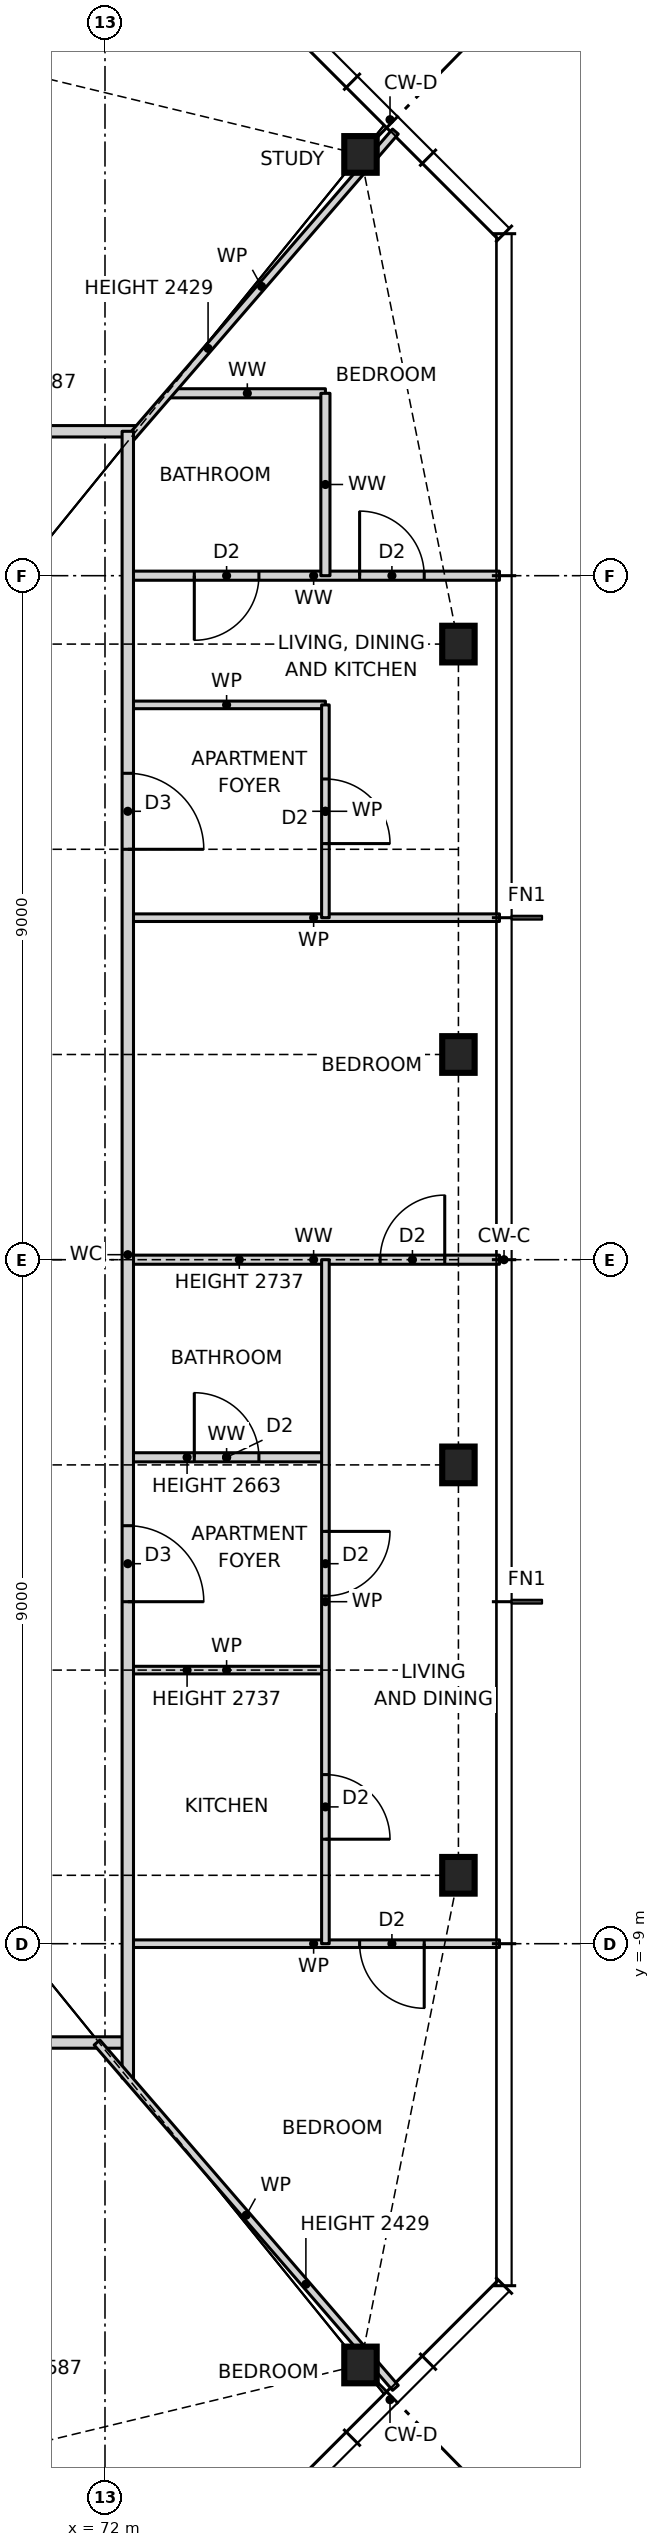
"""IFC4 building model, lengths in metres.
Left out: names, types, materials, properties, quantities, classifications, styles, units other than length and angle.
Written with IfcOpenShell. Run it as: python <this file> out.ifc"""

import sys

from ifc_helpers import new_model, si_unit, direction, frame, frame_2d, origin, origin_2d, place, context, subcontext, project, spatial, rectangle, i_section, extrude, element, fill, save


model = new_model("IFC4")
c1 = context("Model", 3, precision=1e-05, world=origin(), true_north=direction((0.0, 1.0)))
c2 = subcontext(c1, "Body", "Model", "MODEL_VIEW")
j1 = project(units=[si_unit("LENGTHUNIT", "METRE"), si_unit("PLANEANGLEUNIT", "RADIAN")], contexts=[c1])
p1 = place(None, origin())
s1 = spatial("IfcSite", under=j1, at=p1, CompositionType="ELEMENT")
p2 = place(p1, origin())
s2 = spatial("IfcBuilding", under=s1, at=p2, CompositionType="ELEMENT")
p3 = place(p2, frame((0.0, 0.0, 108.5)))
s3 = spatial("IfcBuildingStorey", under=s2, at=p3, CompositionType="ELEMENT", Elevation=108.5)
for number, where, z_axis, x_axis in (
    (1, (75.361, -14.543, 0.0), (0.0, 0.0, 1.0), (1.0, 0.0, 0.0)),
    (2, (76.65, -8.1, 0.0), (0.0, 0.0, 1.0), (1.0, 0.0, 0.0)),
    (3, (76.65, -2.7, 0.0), (0.0, 0.0, 1.0), (1.0, 0.0, 0.0)),
    (4, (76.65, 2.7, 0.0), (0.0, 0.0, 1.0), (1.0, 0.0, 0.0)),
    (5, (76.65, 8.1, 0.0), (0.0, 0.0, 1.0), (1.0, 0.0, 0.0)),
    (6, (75.361, 14.543, 0.0), (0.0, 0.0, 1.0), (1.0, 0.0, 0.0)),
):
    element("IfcColumn", number, at=place(p3, frame(where, z_axis=z_axis, x_axis=x_axis)), inside=s3, PredefinedType="COLUMN", context=c2, shape_type="SweptSolid", body=[
        extrude(i_section(OverallWidth=0.427, OverallDepth=0.483, WebThickness=0.051, FlangeThickness=0.082, at=origin_2d()), origin(), (0.0, 0.0, 1.0), 3.5),
    ])
p4 = place(p3, frame((53.7, -10.3, 0.0), z_axis=(0.0, 0.0, 1.0), x_axis=(1.0, 0.0, 0.0)))
e7 = element("IfcWall", 7, at=p4, inside=s3, PredefinedType="PARTITIONING", context=c2, shape_type="SweptSolid", body=[
    extrude(rectangle(XDim=18.6, YDim=0.15, at=frame_2d((9.3, 0.0))), origin(), (0.0, 0.0, 1.0), 3.27),
])
p5 = place(p4, frame((8.8, 0.0, 0.0)))
e8 = element("IfcOpeningElement", 8, at=p5, cuts=e7, PredefinedType="OPENING", context=c2, shape_type="SweptSolid", body=[
    extrude(rectangle(XDim=1.0, YDim=2.1, at=frame_2d((0.5, 1.05))), frame((0.0, 0.085, 0.0), z_axis=(0.0, -1.0, 0.0), x_axis=(1.0, 0.0, 0.0)), (0.0, 0.0, 1.0), 0.17),
])
p6 = place(p3, frame((72.3, -9.0, 0.0), z_axis=(0.0, 0.0, 1.0), x_axis=(1.0, 0.0, 0.0)))
e9 = element("IfcWall", 9, at=p6, inside=s3, PredefinedType="PARTITIONING", context=c2, shape_type="SweptSolid", body=[
    extrude(rectangle(XDim=4.89, YDim=0.1, at=frame_2d((2.445, 0.0))), origin(), (0.0, 0.0, 1.0), 3.27),
])
p7 = place(p6, frame((3.05, 0.0, 0.0)))
e10 = element("IfcOpeningElement", 10, at=p7, cuts=e9, PredefinedType="OPENING", context=c2, shape_type="SweptSolid", body=[
    extrude(rectangle(XDim=0.85, YDim=2.1, at=frame_2d((0.425, 1.05))), frame((0.0, 0.06, 0.0), z_axis=(0.0, -1.0, 0.0), x_axis=(1.0, 0.0, 0.0)), (0.0, 0.0, 1.0), 0.12),
])
p8 = place(p3, frame((72.3, -5.4, 0.0), z_axis=(0.0, 0.0, 1.0), x_axis=(1.0, 0.0, 0.0)))
e11 = element("IfcWall", 11, at=p8, inside=s3, PredefinedType="PARTITIONING", context=c2, shape_type="SweptSolid", body=[
    extrude(rectangle(XDim=2.6, YDim=0.1, at=frame_2d((1.3, 0.0))), origin(), (0.0, 0.0, 1.0), 2.737),
])
p9 = place(p3, frame((72.3, -2.6, 0.0), z_axis=(0.0, 0.0, 1.0), x_axis=(1.0, 0.0, 0.0)))
e12 = element("IfcWall", 12, at=p9, inside=s3, PredefinedType="PARTITIONING", context=c2, shape_type="SweptSolid", body=[
    extrude(rectangle(XDim=2.6, YDim=0.12, at=frame_2d((1.3, 0.0))), origin(), (0.0, 0.0, 1.0), 2.663),
])
p10 = place(p9, frame((0.875, 0.0, 0.0)))
e13 = element("IfcOpeningElement", 13, at=p10, cuts=e12, PredefinedType="OPENING", context=c2, shape_type="SweptSolid", body=[
    extrude(rectangle(XDim=0.85, YDim=2.1, at=frame_2d((0.425, 1.05))), frame((0.0, 0.07, 0.0), z_axis=(0.0, -1.0, 0.0), x_axis=(1.0, 0.0, 0.0)), (0.0, 0.0, 1.0), 0.14),
])
p11 = place(p3, frame((72.3, 0.0, 0.0), z_axis=(0.0, 0.0, 1.0), x_axis=(1.0, 0.0, 0.0)))
e14 = element("IfcWall", 14, at=p11, inside=s3, PredefinedType="PARTITIONING", context=c2, shape_type="SweptSolid", body=[
    extrude(rectangle(XDim=4.89, YDim=0.12, at=frame_2d((2.445, 0.0))), origin(), (0.0, 0.0, 1.0), 2.737),
])
p12 = place(p11, frame((3.32, 0.0, 0.0)))
e15 = element("IfcOpeningElement", 15, at=p12, cuts=e14, PredefinedType="OPENING", context=c2, shape_type="SweptSolid", body=[
    extrude(rectangle(XDim=0.85, YDim=2.1, at=frame_2d((0.425, 1.05))), frame((0.0, 0.07, 0.0), z_axis=(0.0, -1.0, 0.0), x_axis=(1.0, 0.0, 0.0)), (0.0, 0.0, 1.0), 0.14),
])
p13 = place(p3, frame((72.3, 4.5, 0.0), z_axis=(0.0, 0.0, 1.0), x_axis=(1.0, 0.0, 0.0)))
e16 = element("IfcWall", 16, at=p13, inside=s3, PredefinedType="PARTITIONING", context=c2, shape_type="SweptSolid", body=[
    extrude(rectangle(XDim=4.89, YDim=0.1, at=frame_2d((2.445, 0.0))), origin(), (0.0, 0.0, 1.0), 3.27),
])
p14 = place(p3, frame((72.3, 7.3, 0.0), z_axis=(0.0, 0.0, 1.0), x_axis=(1.0, 0.0, 0.0)))
e17 = element("IfcWall", 17, at=p14, inside=s3, PredefinedType="PARTITIONING", context=c2, shape_type="SweptSolid", body=[
    extrude(rectangle(XDim=2.6, YDim=0.1, at=frame_2d((1.3, 0.0))), origin(), (0.0, 0.0, 1.0), 3.27),
])
p15 = place(p3, frame((72.3, 9.0, 0.0), z_axis=(0.0, 0.0, 1.0), x_axis=(1.0, 0.0, 0.0)))
e18 = element("IfcWall", 18, at=p15, inside=s3, PredefinedType="PARTITIONING", context=c2, shape_type="SweptSolid", body=[
    extrude(rectangle(XDim=4.89, YDim=0.12, at=frame_2d((2.445, 0.0))), origin(), (0.0, 0.0, 1.0), 3.27),
])
p16 = place(p15, frame((0.875, 0.0, 0.0)))
e19 = element("IfcOpeningElement", 19, at=p16, cuts=e18, PredefinedType="OPENING", context=c2, shape_type="SweptSolid", body=[
    extrude(rectangle(XDim=0.85, YDim=2.1, at=frame_2d((0.425, 1.05))), frame((0.0, 0.07, 0.0), z_axis=(0.0, -1.0, 0.0), x_axis=(1.0, 0.0, 0.0)), (0.0, 0.0, 1.0), 0.14),
])
p17 = place(p15, frame((3.05, 0.0, 0.0)))
e20 = element("IfcOpeningElement", 20, at=p17, cuts=e18, PredefinedType="OPENING", context=c2, shape_type="SweptSolid", body=[
    extrude(rectangle(XDim=0.85, YDim=2.1, at=frame_2d((0.425, 1.05))), frame((0.0, 0.07, 0.0), z_axis=(0.0, -1.0, 0.0), x_axis=(1.0, 0.0, 0.0)), (0.0, 0.0, 1.0), 0.14),
])
p18 = place(p3, frame((53.586, 10.9, 0.0), z_axis=(0.0, 0.0, 1.0), x_axis=(1.0, 0.0, 0.0)))
e21 = element("IfcWall", 21, at=p18, inside=s3, PredefinedType="PARTITIONING", context=c2, shape_type="SweptSolid", body=[
    extrude(rectangle(XDim=18.828, YDim=0.15, at=frame_2d((9.414, 0.0))), origin(), (0.0, 0.0, 1.0), 3.27),
])
p19 = place(p18, frame((8.914, 0.0, 0.0)))
e22 = element("IfcOpeningElement", 22, at=p19, cuts=e21, PredefinedType="OPENING", context=c2, shape_type="SweptSolid", body=[
    extrude(rectangle(XDim=1.0, YDim=2.1, at=frame_2d((0.5, 1.05))), frame((0.0, 0.085, 0.0), z_axis=(0.0, -1.0, 0.0), x_axis=(1.0, 0.0, 0.0)), (0.0, 0.0, 1.0), 0.17),
])
p20 = place(p3, frame((72.845, 11.4, 0.0), z_axis=(0.0, 0.0, 1.0), x_axis=(1.0, 0.0, 0.0)))
e23 = element("IfcWall", 23, at=p20, inside=s3, PredefinedType="PARTITIONING", context=c2, shape_type="SweptSolid", body=[
    extrude(rectangle(XDim=2.055, YDim=0.12, at=frame_2d((1.027, 0.0))), origin(), (0.0, 0.0, 1.0), 3.27),
])
p21 = place(p3, frame((72.3, 10.768, 0.0), z_axis=(0.0, 0.0, 1.0), x_axis=(0.653709560919, 0.756745538449, 0.0)))
e24 = element("IfcWall", 24, at=p21, inside=s3, PredefinedType="PARTITIONING", context=c2, shape_type="SweptSolid", body=[
    extrude(rectangle(XDim=5.386, YDim=0.1, at=frame_2d((2.693, 0.0))), origin(), (0.0, 0.0, 1.0), 2.429),
])
p22 = place(p3, frame((74.9, -9.0, 0.0), z_axis=(0.0, 0.0, 1.0), x_axis=(0.0, 1.0, 0.0)))
e25 = element("IfcWall", 25, at=p22, inside=s3, PredefinedType="PARTITIONING", context=c2, shape_type="SweptSolid", body=[
    extrude(rectangle(XDim=9.0, YDim=0.1, at=frame_2d((4.5, 0.0))), origin(), (0.0, 0.0, 1.0), 3.27),
])
p23 = place(p22, frame((1.375, 0.0, 0.0)))
e26 = element("IfcOpeningElement", 26, at=p23, cuts=e25, PredefinedType="OPENING", context=c2, shape_type="SweptSolid", body=[
    extrude(rectangle(XDim=0.85, YDim=2.1, at=frame_2d((0.425, 1.05))), frame((0.0, 0.06, 0.0), z_axis=(0.0, -1.0, 0.0), x_axis=(1.0, 0.0, 0.0)), (0.0, 0.0, 1.0), 0.12),
])
p24 = place(p22, frame((4.575, 0.0, 0.0)))
e27 = element("IfcOpeningElement", 27, at=p24, cuts=e25, PredefinedType="OPENING", context=c2, shape_type="SweptSolid", body=[
    extrude(rectangle(XDim=0.85, YDim=2.1, at=frame_2d((0.425, 1.05))), frame((0.0, 0.06, 0.0), z_axis=(0.0, -1.0, 0.0), x_axis=(1.0, 0.0, 0.0)), (0.0, 0.0, 1.0), 0.12),
])
p25 = place(p3, frame((74.9, 4.5, 0.0), z_axis=(0.0, 0.0, 1.0), x_axis=(0.0, 1.0, 0.0)))
e28 = element("IfcWall", 28, at=p25, inside=s3, PredefinedType="PARTITIONING", context=c2, shape_type="SweptSolid", body=[
    extrude(rectangle(XDim=2.8, YDim=0.1, at=frame_2d((1.4, 0.0))), origin(), (0.0, 0.0, 1.0), 3.27),
])
p26 = place(p25, frame((0.975, 0.0, 0.0)))
e29 = element("IfcOpeningElement", 29, at=p26, cuts=e28, PredefinedType="OPENING", context=c2, shape_type="SweptSolid", body=[
    extrude(rectangle(XDim=0.85, YDim=2.1, at=frame_2d((0.425, 1.05))), frame((0.0, 0.06, 0.0), z_axis=(0.0, -1.0, 0.0), x_axis=(1.0, 0.0, 0.0)), (0.0, 0.0, 1.0), 0.12),
])
p27 = place(p3, frame((74.9, 9.0, 0.0), z_axis=(0.0, 0.0, 1.0), x_axis=(0.0, 1.0, 0.0)))
e30 = element("IfcWall", 30, at=p27, inside=s3, PredefinedType="PARTITIONING", context=c2, shape_type="SweptSolid", body=[
    extrude(rectangle(XDim=2.4, YDim=0.12, at=frame_2d((1.2, 0.0))), origin(), (0.0, 0.0, 1.0), 3.27),
])
p28 = place(p3, frame((72.3, -10.768, 0.0), z_axis=(0.0, 0.0, 1.0), x_axis=(0.0, 1.0, 0.0)))
e31 = element("IfcWall", 31, at=p28, inside=s3, PredefinedType="PARTITIONING", context=c2, shape_type="SweptSolid", body=[
    extrude(rectangle(XDim=21.668, YDim=0.15, at=frame_2d((10.834, 0.0))), origin(), (0.0, 0.0, 1.0), 3.27),
])
p29 = place(p28, frame((6.268, 0.0, 0.0)))
e32 = element("IfcOpeningElement", 32, at=p29, cuts=e31, PredefinedType="OPENING", context=c2, shape_type="SweptSolid", body=[
    extrude(rectangle(XDim=1.0, YDim=2.1, at=frame_2d((0.5, 1.05))), frame((0.0, 0.085, 0.0), z_axis=(0.0, -1.0, 0.0), x_axis=(1.0, 0.0, 0.0)), (0.0, 0.0, 1.0), 0.17),
])
p30 = place(p28, frame((16.168, 0.0, 0.0)))
e33 = element("IfcOpeningElement", 33, at=p30, cuts=e31, PredefinedType="OPENING", context=c2, shape_type="SweptSolid", body=[
    extrude(rectangle(XDim=1.0, YDim=2.1, at=frame_2d((0.5, 1.05))), frame((0.0, 0.085, 0.0), z_axis=(0.0, -1.0, 0.0), x_axis=(1.0, 0.0, 0.0)), (0.0, 0.0, 1.0), 0.17),
])
p31 = place(p3, frame((75.821, -14.844, 0.0), z_axis=(0.0, 0.0, 1.0), x_axis=(-0.65378286253, 0.756682211144, 0.0)))
e34 = element("IfcWall", 34, at=p31, inside=s3, PredefinedType="PARTITIONING", context=c2, shape_type="SweptSolid", body=[
    extrude(rectangle(XDim=6.005, YDim=0.1, at=frame_2d((3.002, 0.0))), origin(), (0.0, 0.0, 1.0), 2.429),
])
p32 = place(p23, frame((0.85, 0.0, 0.0), z_axis=(0.0, 0.0, 1.0), x_axis=(-1.0, 0.0, 0.0)))
e35 = element("IfcDoor", 35, at=p32, inside=s3, OperationType="SINGLE_SWING_RIGHT", PredefinedType="DOOR", context=c2, shape_type="SweptSolid", body=[
    extrude(rectangle(XDim=0.85, YDim=2.1, at=frame_2d((0.425, 1.05))), frame((0.0, 0.025, 0.0), z_axis=(0.0, -1.0, 0.0), x_axis=(1.0, 0.0, 0.0)), (0.0, 0.0, 1.0), 0.05),
])
fill(e26, e35)
p33 = place(p29, frame((1.0, 0.0, 0.0), z_axis=(0.0, 0.0, 1.0), x_axis=(-1.0, 0.0, 0.0)))
e36 = element("IfcDoor", 36, at=p33, inside=s3, OperationType="SINGLE_SWING_RIGHT", PredefinedType="DOOR", context=c2, shape_type="SweptSolid", body=[
    extrude(rectangle(XDim=1.0, YDim=2.1, at=frame_2d((0.5, 1.05))), frame((0.0, 0.025, 0.0), z_axis=(0.0, -1.0, 0.0), x_axis=(1.0, 0.0, 0.0)), (0.0, 0.0, 1.0), 0.05),
])
fill(e32, e36)
p34 = place(p24, frame((0.85, 0.0, 0.0), z_axis=(0.0, 0.0, 1.0), x_axis=(-1.0, 0.0, 0.0)))
e37 = element("IfcDoor", 37, at=p34, inside=s3, OperationType="SINGLE_SWING_LEFT", PredefinedType="DOOR", context=c2, shape_type="SweptSolid", body=[
    extrude(rectangle(XDim=0.85, YDim=2.1, at=frame_2d((0.425, 1.05))), frame((0.0, 0.025, 0.0), z_axis=(0.0, -1.0, 0.0), x_axis=(1.0, 0.0, 0.0)), (0.0, 0.0, 1.0), 0.05),
])
fill(e27, e37)
p35 = place(p10, origin())
e38 = element("IfcDoor", 38, at=p35, inside=s3, OperationType="SINGLE_SWING_LEFT", PredefinedType="DOOR", context=c2, shape_type="SweptSolid", body=[
    extrude(rectangle(XDim=0.85, YDim=2.1, at=frame_2d((0.425, 1.05))), frame((0.0, 0.025, 0.0), z_axis=(0.0, -1.0, 0.0), x_axis=(1.0, 0.0, 0.0)), (0.0, 0.0, 1.0), 0.05),
])
fill(e13, e38)
p36 = place(p7, frame((0.85, 0.0, 0.0), z_axis=(0.0, 0.0, 1.0), x_axis=(-1.0, 0.0, 0.0)))
e39 = element("IfcDoor", 39, at=p36, inside=s3, OperationType="SINGLE_SWING_LEFT", PredefinedType="DOOR", context=c2, shape_type="SweptSolid", body=[
    extrude(rectangle(XDim=0.85, YDim=2.1, at=frame_2d((0.425, 1.05))), frame((0.0, 0.025, 0.0), z_axis=(0.0, -1.0, 0.0), x_axis=(1.0, 0.0, 0.0)), (0.0, 0.0, 1.0), 0.05),
])
fill(e10, e39)
p37 = place(p12, origin())
e40 = element("IfcDoor", 40, at=p37, inside=s3, OperationType="SINGLE_SWING_RIGHT", PredefinedType="DOOR", context=c2, shape_type="SweptSolid", body=[
    extrude(rectangle(XDim=0.85, YDim=2.1, at=frame_2d((0.425, 1.05))), frame((0.0, 0.025, 0.0), z_axis=(0.0, -1.0, 0.0), x_axis=(1.0, 0.0, 0.0)), (0.0, 0.0, 1.0), 0.05),
])
fill(e15, e40)
p38 = place(p30, frame((1.0, 0.0, 0.0), z_axis=(0.0, 0.0, 1.0), x_axis=(-1.0, 0.0, 0.0)))
e41 = element("IfcDoor", 41, at=p38, inside=s3, OperationType="SINGLE_SWING_RIGHT", PredefinedType="DOOR", context=c2, shape_type="SweptSolid", body=[
    extrude(rectangle(XDim=1.0, YDim=2.1, at=frame_2d((0.5, 1.05))), frame((0.0, 0.025, 0.0), z_axis=(0.0, -1.0, 0.0), x_axis=(1.0, 0.0, 0.0)), (0.0, 0.0, 1.0), 0.05),
])
fill(e33, e41)
p39 = place(p26, frame((0.85, 0.0, 0.0), z_axis=(0.0, 0.0, 1.0), x_axis=(-1.0, 0.0, 0.0)))
e42 = element("IfcDoor", 42, at=p39, inside=s3, OperationType="SINGLE_SWING_RIGHT", PredefinedType="DOOR", context=c2, shape_type="SweptSolid", body=[
    extrude(rectangle(XDim=0.85, YDim=2.1, at=frame_2d((0.425, 1.05))), frame((0.0, 0.025, 0.0), z_axis=(0.0, -1.0, 0.0), x_axis=(1.0, 0.0, 0.0)), (0.0, 0.0, 1.0), 0.05),
])
fill(e29, e42)
p40 = place(p16, frame((0.85, 0.0, 0.0), z_axis=(0.0, 0.0, 1.0), x_axis=(-1.0, 0.0, 0.0)))
e43 = element("IfcDoor", 43, at=p40, inside=s3, OperationType="SINGLE_SWING_RIGHT", PredefinedType="DOOR", context=c2, shape_type="SweptSolid", body=[
    extrude(rectangle(XDim=0.85, YDim=2.1, at=frame_2d((0.425, 1.05))), frame((0.0, 0.025, 0.0), z_axis=(0.0, -1.0, 0.0), x_axis=(1.0, 0.0, 0.0)), (0.0, 0.0, 1.0), 0.05),
])
fill(e19, e43)
p41 = place(p17, origin())
e44 = element("IfcDoor", 44, at=p41, inside=s3, OperationType="SINGLE_SWING_LEFT", PredefinedType="DOOR", context=c2, shape_type="SweptSolid", body=[
    extrude(rectangle(XDim=0.85, YDim=2.1, at=frame_2d((0.425, 1.05))), frame((0.0, 0.025, 0.0), z_axis=(0.0, -1.0, 0.0), x_axis=(1.0, 0.0, 0.0)), (0.0, 0.0, 1.0), 0.05),
])
fill(e20, e44)
save(model, sys.argv[1])
